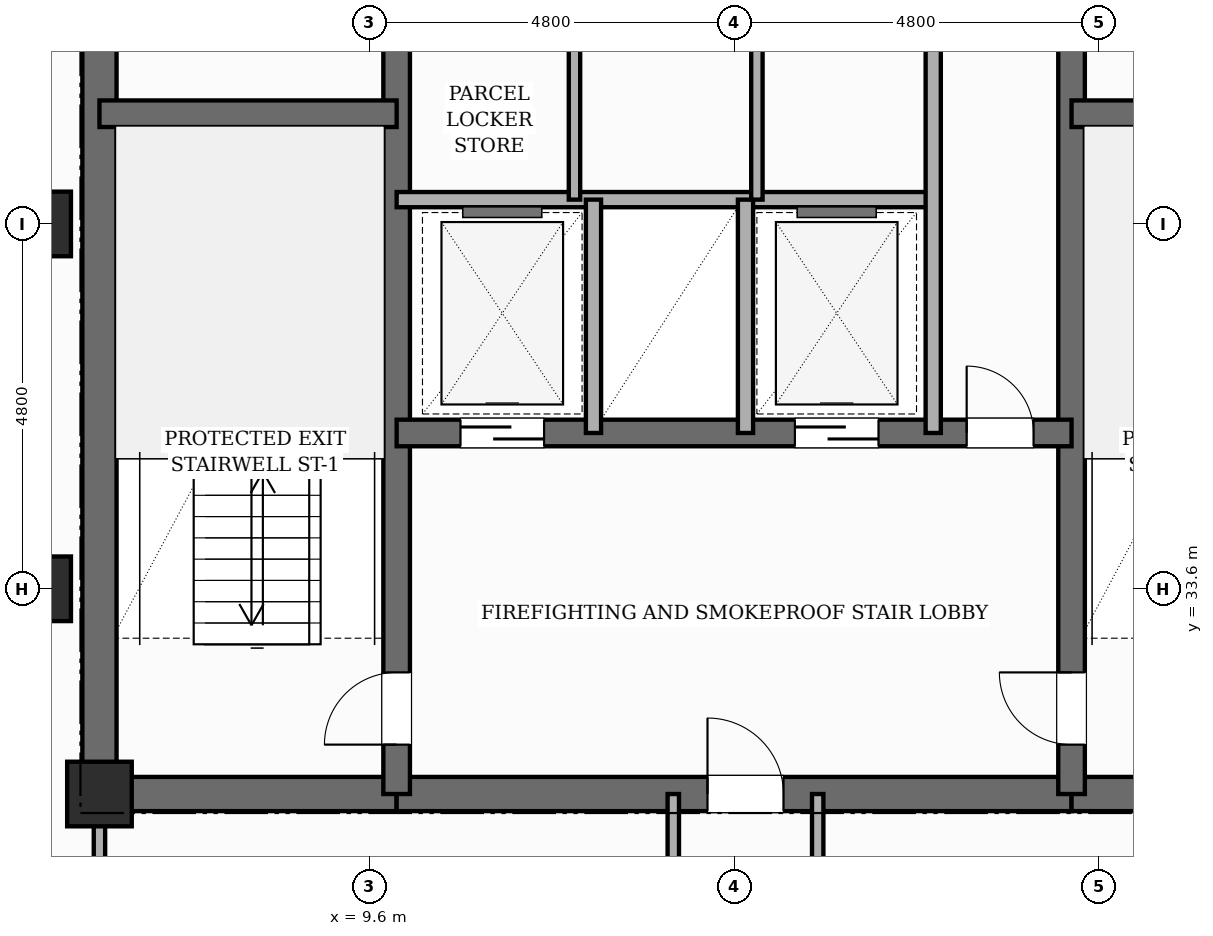
"""IFC4 building model, lengths in metres.
Left out: names, types, materials, properties, quantities, classifications, styles, units other than length and angle.
Written with IfcOpenShell. Run it as: python <this file> out.ifc"""

import sys

from ifc_helpers import new_model, si_unit, direction, frame, frame_2d, origin, origin_2d, place, context, subcontext, project, spatial, rectangle, extrude, element, fill, save


model = new_model("IFC4")
c1 = context("Model", 3, precision=1e-05, world=origin(), true_north=direction((0.0, 1.0)))
c2 = subcontext(c1, "Body", "Model", "MODEL_VIEW")
j1 = project(units=[si_unit("LENGTHUNIT", "METRE"), si_unit("PLANEANGLEUNIT", "RADIAN")], contexts=[c1])
p1 = place(None, origin())
s1 = spatial("IfcSite", under=j1, at=p1, CompositionType="ELEMENT")
p2 = place(p1, origin())
s2 = spatial("IfcBuilding", under=s1, at=p2, CompositionType="ELEMENT")
p3 = place(p2, frame((0.0, 0.0, 207.4)))
s3 = spatial("IfcBuildingStorey", under=s2, at=p3, CompositionType="ELEMENT", Elevation=207.4)
p4 = place(p3, frame((6.05, 30.675, 0.0), z_axis=(0.0, 0.0, 1.0), x_axis=(0.0, 1.0, 0.0)))
e1 = element("IfcWall", 1, at=p4, inside=s3, PredefinedType="SHEAR", context=c2, shape_type="SweptSolid", body=[
    extrude(rectangle(XDim=15.35, YDim=0.45, at=frame_2d((7.675, 0.0))), origin(), (0.0, 0.0, 1.0), 3.6),
])
p5 = place(p4, frame((10.675, 0.0, 0.0)))
e2 = element("IfcOpeningElement", 2, at=p5, cuts=e1, PredefinedType="OPENING", context=c2, shape_type="SweptSolid", body=[
    extrude(rectangle(XDim=0.95, YDim=2.15, at=frame_2d((0.475, 1.075))), frame((0.0, 0.235, 0.0), z_axis=(0.0, -1.0, 0.0), x_axis=(1.0, 0.0, 0.0)), (0.0, 0.0, 1.0), 0.47),
])
p6 = place(p3, frame((6.05, 30.9, 0.0), z_axis=(0.0, 0.0, 1.0), x_axis=(1.0, 0.0, 0.0)))
e3 = element("IfcWall", 3, at=p6, inside=s3, PredefinedType="SHEAR", context=c2, shape_type="SweptSolid", body=[
    extrude(rectangle(XDim=3.91, YDim=0.45, at=frame_2d((1.955, 0.0))), origin(), (0.0, 0.0, 1.0), 3.6),
])
p7 = place(p3, frame((9.96, 30.9, 0.0), z_axis=(0.0, 0.0, 1.0), x_axis=(1.0, 0.0, 0.0)))
e4 = element("IfcWall", 4, at=p7, inside=s3, PredefinedType="SHEAR", context=c2, shape_type="SweptSolid", body=[
    extrude(rectangle(XDim=8.88, YDim=0.45, at=frame_2d((4.44, 0.0))), origin(), (0.0, 0.0, 1.0), 3.6),
])
p8 = place(p7, frame((4.09, 0.0, 0.0)))
e5 = element("IfcOpeningElement", 5, at=p8, cuts=e4, PredefinedType="OPENING", context=c2, shape_type="SweptSolid", body=[
    extrude(rectangle(XDim=1.0, YDim=2.15, at=frame_2d((0.5, 1.075))), frame((0.0, 0.235, 0.0), z_axis=(0.0, -1.0, 0.0), x_axis=(1.0, 0.0, 0.0)), (0.0, 0.0, 1.0), 0.47),
])
p9 = place(p3, frame((18.84, 30.9, 0.0), z_axis=(0.0, 0.0, 1.0), x_axis=(1.0, 0.0, 0.0)))
e6 = element("IfcWall", 6, at=p9, inside=s3, PredefinedType="SHEAR", context=c2, shape_type="SweptSolid", body=[
    extrude(rectangle(XDim=3.91, YDim=0.45, at=frame_2d((1.955, 0.0))), origin(), (0.0, 0.0, 1.0), 3.6),
])
p10 = place(p3, frame((9.96, 30.9, 0.0), z_axis=(0.0, 0.0, 1.0), x_axis=(0.0, 1.0, 0.0)))
e7 = element("IfcWall", 7, at=p10, inside=s3, PredefinedType="SHEAR", context=c2, shape_type="SweptSolid", body=[
    extrude(rectangle(XDim=14.9, YDim=0.35, at=frame_2d((7.45, 0.0))), origin(), (0.0, 0.0, 1.0), 3.6),
])
p11 = place(p10, frame((0.65, 0.0, 0.0)))
e8 = element("IfcOpeningElement", 8, at=p11, cuts=e7, PredefinedType="OPENING", context=c2, shape_type="SweptSolid", body=[
    extrude(rectangle(XDim=0.95, YDim=2.1, at=frame_2d((0.475, 1.05))), frame((0.0, 0.185, 0.0), z_axis=(0.0, -1.0, 0.0), x_axis=(1.0, 0.0, 0.0)), (0.0, 0.0, 1.0), 0.37),
])
p12 = place(p10, frame((10.45, 0.0, 0.0)))
e9 = element("IfcOpeningElement", 9, at=p12, cuts=e7, PredefinedType="OPENING", context=c2, shape_type="SweptSolid", body=[
    extrude(rectangle(XDim=1.0, YDim=2.15, at=frame_2d((0.5, 1.075))), frame((0.0, 0.185, 0.0), z_axis=(0.0, -1.0, 0.0), x_axis=(1.0, 0.0, 0.0)), (0.0, 0.0, 1.0), 0.37),
])
p13 = place(p3, frame((18.84, 30.9, 0.0), z_axis=(0.0, 0.0, 1.0), x_axis=(0.0, 1.0, 0.0)))
e10 = element("IfcWall", 10, at=p13, inside=s3, PredefinedType="SHEAR", context=c2, shape_type="SweptSolid", body=[
    extrude(rectangle(XDim=14.9, YDim=0.35, at=frame_2d((7.45, 0.0))), origin(), (0.0, 0.0, 1.0), 3.6),
])
p14 = place(p13, frame((0.65, 0.0, 0.0)))
e11 = element("IfcOpeningElement", 11, at=p14, cuts=e10, PredefinedType="OPENING", context=c2, shape_type="SweptSolid", body=[
    extrude(rectangle(XDim=0.95, YDim=2.1, at=frame_2d((0.475, 1.05))), frame((0.0, 0.185, 0.0), z_axis=(0.0, -1.0, 0.0), x_axis=(1.0, 0.0, 0.0)), (0.0, 0.0, 1.0), 0.37),
])
p15 = place(p13, frame((10.45, 0.0, 0.0)))
e12 = element("IfcOpeningElement", 12, at=p15, cuts=e10, PredefinedType="OPENING", context=c2, shape_type="SweptSolid", body=[
    extrude(rectangle(XDim=1.0, YDim=2.15, at=frame_2d((0.5, 1.075))), frame((0.0, 0.185, 0.0), z_axis=(0.0, -1.0, 0.0), x_axis=(1.0, 0.0, 0.0)), (0.0, 0.0, 1.0), 0.37),
])
for number, where, z_axis, x_axis in (
    (13, (6.05, 39.85, 0.0), (0.0, 0.0, 1.0), (1.0, 0.0, 0.0)),
    (14, (18.84, 39.85, 0.0), (0.0, 0.0, 1.0), (1.0, 0.0, 0.0)),
):
    element("IfcWall", number, at=place(p3, frame(where, z_axis=z_axis, x_axis=x_axis)), inside=s3, PredefinedType="SHEAR", context=c2, shape_type="SweptSolid", body=[
        extrude(rectangle(XDim=3.91, YDim=0.35, at=frame_2d((1.955, 0.0))), origin(), (0.0, 0.0, 1.0), 3.6),
    ])
p16 = place(p3, frame((9.96, 35.65, 0.0), z_axis=(0.0, 0.0, 1.0), x_axis=(1.0, 0.0, 0.0)))
e15 = element("IfcWall", 15, at=p16, inside=s3, PredefinedType="SHEAR", context=c2, shape_type="SweptSolid", body=[
    extrude(rectangle(XDim=8.88, YDim=0.35, at=frame_2d((4.44, 0.0))), origin(), (0.0, 0.0, 1.0), 3.6),
])
p17 = place(p16, frame((0.84, 0.0, 0.0)))
e16 = element("IfcOpeningElement", 16, at=p17, cuts=e15, PredefinedType="OPENING", context=c2, shape_type="SweptSolid", body=[
    extrude(rectangle(XDim=1.1, YDim=2.15, at=frame_2d((0.55, 1.075))), frame((0.0, 0.185, 0.0), z_axis=(0.0, -1.0, 0.0), x_axis=(1.0, 0.0, 0.0)), (0.0, 0.0, 1.0), 0.37),
])
p18 = place(p16, frame((5.24, 0.0, 0.0)))
e17 = element("IfcOpeningElement", 17, at=p18, cuts=e15, PredefinedType="OPENING", context=c2, shape_type="SweptSolid", body=[
    extrude(rectangle(XDim=1.1, YDim=2.15, at=frame_2d((0.55, 1.075))), frame((0.0, 0.185, 0.0), z_axis=(0.0, -1.0, 0.0), x_axis=(1.0, 0.0, 0.0)), (0.0, 0.0, 1.0), 0.37),
])
p19 = place(p16, frame((7.5, 0.0, 0.0)))
e18 = element("IfcOpeningElement", 18, at=p19, cuts=e15, PredefinedType="OPENING", context=c2, shape_type="SweptSolid", body=[
    extrude(rectangle(XDim=0.88, YDim=2.1, at=frame_2d((0.44, 1.05))), frame((0.0, 0.185, 0.0), z_axis=(0.0, -1.0, 0.0), x_axis=(1.0, 0.0, 0.0)), (0.0, 0.0, 1.0), 0.37),
])
for number, where, z_axis, x_axis in (
    (19, (5.25, 33.6, 0.0), (0.0, 0.0, 1.0), (1.0, 0.0, 0.0)),
    (20, (5.25, 38.4, 0.0), (0.0, 0.0, 1.0), (1.0, 0.0, 0.0)),
    (21, (6.05, 30.9, 0.0), (0.0, 0.0, 1.0), (1.0, 0.0, 0.0)),
):
    element("IfcColumn", number, at=place(p3, frame(where, z_axis=z_axis, x_axis=x_axis)), inside=s3, PredefinedType="COLUMN", context=c2, shape_type="SweptSolid", body=[
        extrude(rectangle(XDim=0.85, YDim=0.85, at=origin_2d()), origin(), (0.0, 0.0, 1.0), 3.6),
    ])
p20 = place(p3, frame((9.96, 38.72, 0.0), z_axis=(0.0, 0.0, 1.0), x_axis=(1.0, 0.0, 0.0)))
e22 = element("IfcWall", 22, at=p20, inside=s3, PredefinedType="POLYGONAL", context=c2, shape_type="SweptSolid", body=[
    extrude(rectangle(XDim=7.06, YDim=0.2, at=frame_2d((3.53, 0.0))), origin(), (0.0, 0.0, 1.0), 3.38),
])
for number, where, z_axis, x_axis in (
    (23, (12.55, 35.65, 0.0), (0.0, 0.0, 1.0), (0.0, 1.0, 0.0)),
    (24, (14.55, 35.65, 0.0), (0.0, 0.0, 1.0), (0.0, 1.0, 0.0)),
):
    element("IfcWall", number, at=place(p3, frame(where, z_axis=z_axis, x_axis=x_axis)), inside=s3, PredefinedType="POLYGONAL", context=c2, shape_type="SweptSolid", body=[
        extrude(rectangle(XDim=3.07, YDim=0.2, at=frame_2d((1.535, 0.0))), origin(), (0.0, 0.0, 1.0), 3.38),
    ])
p21 = place(p3, frame((17.02, 35.65, 0.0), z_axis=(0.0, 0.0, 1.0), x_axis=(0.0, 1.0, 0.0)))
e25 = element("IfcWall", 25, at=p21, inside=s3, PredefinedType="POLYGONAL", context=c2, shape_type="SweptSolid", body=[
    extrude(rectangle(XDim=5.15, YDim=0.2, at=frame_2d((2.575, 0.0))), origin(), (0.0, 0.0, 1.0), 3.38),
])
for number, where, z_axis, x_axis in (
    (26, (12.3, 38.72, 0.0), (0.0, 0.0, 1.0), (0.0, 1.0, 0.0)),
    (27, (14.7, 38.72, 0.0), (0.0, 0.0, 1.0), (0.0, 1.0, 0.0)),
):
    element("IfcWall", number, at=place(p3, frame(where, z_axis=z_axis, x_axis=x_axis)), inside=s3, PredefinedType="PARTITIONING", context=c2, shape_type="SweptSolid", body=[
        extrude(rectangle(XDim=2.08, YDim=0.15, at=frame_2d((1.04, 0.0))), origin(), (0.0, 0.0, 1.0), 3.38),
    ])
p22 = place(p3, frame((13.6, 25.75, 0.0), z_axis=(0.0, 0.0, 1.0), x_axis=(0.0, 1.0, 0.0)))
e28 = element("IfcWall", 28, at=p22, inside=s3, PredefinedType="PARTITIONING", context=c2, shape_type="SweptSolid", body=[
    extrude(rectangle(XDim=5.15, YDim=0.15, at=frame_2d((2.575, 0.0))), origin(), (0.0, 0.0, 1.0), 3.38),
])
p23 = place(p22, frame((0.65, 0.0, 0.0)))
e29 = element("IfcOpeningElement", 29, at=p23, cuts=e28, PredefinedType="OPENING", context=c2, shape_type="SweptSolid", body=[
    extrude(rectangle(XDim=0.95, YDim=2.15, at=frame_2d((0.475, 1.075))), frame((0.0, 0.085, 0.0), z_axis=(0.0, -1.0, 0.0), x_axis=(1.0, 0.0, 0.0)), (0.0, 0.0, 1.0), 0.17),
])
p24 = place(p22, frame((3.1, 0.0, 0.0)))
e30 = element("IfcOpeningElement", 30, at=p24, cuts=e28, PredefinedType="OPENING", context=c2, shape_type="SweptSolid", body=[
    extrude(rectangle(XDim=0.95, YDim=2.15, at=frame_2d((0.475, 1.075))), frame((0.0, 0.085, 0.0), z_axis=(0.0, -1.0, 0.0), x_axis=(1.0, 0.0, 0.0)), (0.0, 0.0, 1.0), 0.17),
])
p25 = place(p3, frame((15.5, 25.75, 0.0), z_axis=(0.0, 0.0, 1.0), x_axis=(0.0, 1.0, 0.0)))
e31 = element("IfcWall", 31, at=p25, inside=s3, PredefinedType="PARTITIONING", context=c2, shape_type="SweptSolid", body=[
    extrude(rectangle(XDim=5.15, YDim=0.15, at=frame_2d((2.575, 0.0))), origin(), (0.0, 0.0, 1.0), 3.38),
])
p26 = place(p25, frame((1.1, 0.0, 0.0)))
e32 = element("IfcOpeningElement", 32, at=p26, cuts=e31, PredefinedType="OPENING", context=c2, shape_type="SweptSolid", body=[
    extrude(rectangle(XDim=0.95, YDim=2.15, at=frame_2d((0.475, 1.075))), frame((0.0, 0.085, 0.0), z_axis=(0.0, -1.0, 0.0), x_axis=(1.0, 0.0, 0.0)), (0.0, 0.0, 1.0), 0.17),
])
p27 = place(p3, frame((6.05, 25.75, 0.0), z_axis=(0.0, 0.0, 1.0), x_axis=(0.0, 1.0, 0.0)))
e33 = element("IfcWall", 33, at=p27, inside=s3, PredefinedType="PARTITIONING", context=c2, shape_type="SweptSolid", body=[
    extrude(rectangle(XDim=5.15, YDim=0.15, at=frame_2d((2.575, 0.0))), origin(), (0.0, 0.0, 1.0), 3.38),
])
p28 = place(p11, origin())
e34 = element("IfcDoor", 34, at=p28, inside=s3, OperationType="SINGLE_SWING_LEFT", PredefinedType="DOOR", context=c2, shape_type="SweptSolid", body=[
    extrude(rectangle(XDim=0.95, YDim=2.1, at=frame_2d((0.475, 1.05))), frame((0.0, 0.025, 0.0), z_axis=(0.0, -1.0, 0.0), x_axis=(1.0, 0.0, 0.0)), (0.0, 0.0, 1.0), 0.05),
])
fill(e8, e34)
p29 = place(p14, origin())
e35 = element("IfcDoor", 35, at=p29, inside=s3, OperationType="SINGLE_SWING_RIGHT", PredefinedType="DOOR", context=c2, shape_type="SweptSolid", body=[
    extrude(rectangle(XDim=0.95, YDim=2.1, at=frame_2d((0.475, 1.05))), frame((0.0, 0.025, 0.0), z_axis=(0.0, -1.0, 0.0), x_axis=(1.0, 0.0, 0.0)), (0.0, 0.0, 1.0), 0.05),
])
fill(e11, e35)
p30 = place(p8, origin())
e36 = element("IfcDoor", 36, at=p30, inside=s3, OperationType="SINGLE_SWING_LEFT", PredefinedType="DOOR", context=c2, shape_type="SweptSolid", body=[
    extrude(rectangle(XDim=1.0, YDim=2.15, at=frame_2d((0.5, 1.075))), frame((0.0, 0.025, 0.0), z_axis=(0.0, -1.0, 0.0), x_axis=(1.0, 0.0, 0.0)), (0.0, 0.0, 1.0), 0.05),
])
fill(e5, e36)
p31 = place(p17, origin())
e37 = element("IfcDoor", 37, at=p31, inside=s3, OperationType="SLIDING_TO_LEFT", PredefinedType="DOOR", context=c2, shape_type="SweptSolid", body=[
    extrude(rectangle(XDim=1.1, YDim=2.15, at=frame_2d((0.55, 1.075))), frame((0.0, 0.025, 0.0), z_axis=(0.0, -1.0, 0.0), x_axis=(1.0, 0.0, 0.0)), (0.0, 0.0, 1.0), 0.05),
])
fill(e16, e37)
p32 = place(p18, origin())
e38 = element("IfcDoor", 38, at=p32, inside=s3, OperationType="SLIDING_TO_RIGHT", PredefinedType="DOOR", context=c2, shape_type="SweptSolid", body=[
    extrude(rectangle(XDim=1.1, YDim=2.15, at=frame_2d((0.55, 1.075))), frame((0.0, 0.025, 0.0), z_axis=(0.0, -1.0, 0.0), x_axis=(1.0, 0.0, 0.0)), (0.0, 0.0, 1.0), 0.05),
])
fill(e17, e38)
p33 = place(p19, origin())
e39 = element("IfcDoor", 39, at=p33, inside=s3, OperationType="SINGLE_SWING_LEFT", PredefinedType="DOOR", context=c2, shape_type="SweptSolid", body=[
    extrude(rectangle(XDim=0.88, YDim=2.1, at=frame_2d((0.44, 1.05))), frame((0.0, 0.025, 0.0), z_axis=(0.0, -1.0, 0.0), x_axis=(1.0, 0.0, 0.0)), (0.0, 0.0, 1.0), 0.05),
])
fill(e18, e39)
save(model, sys.argv[1])
